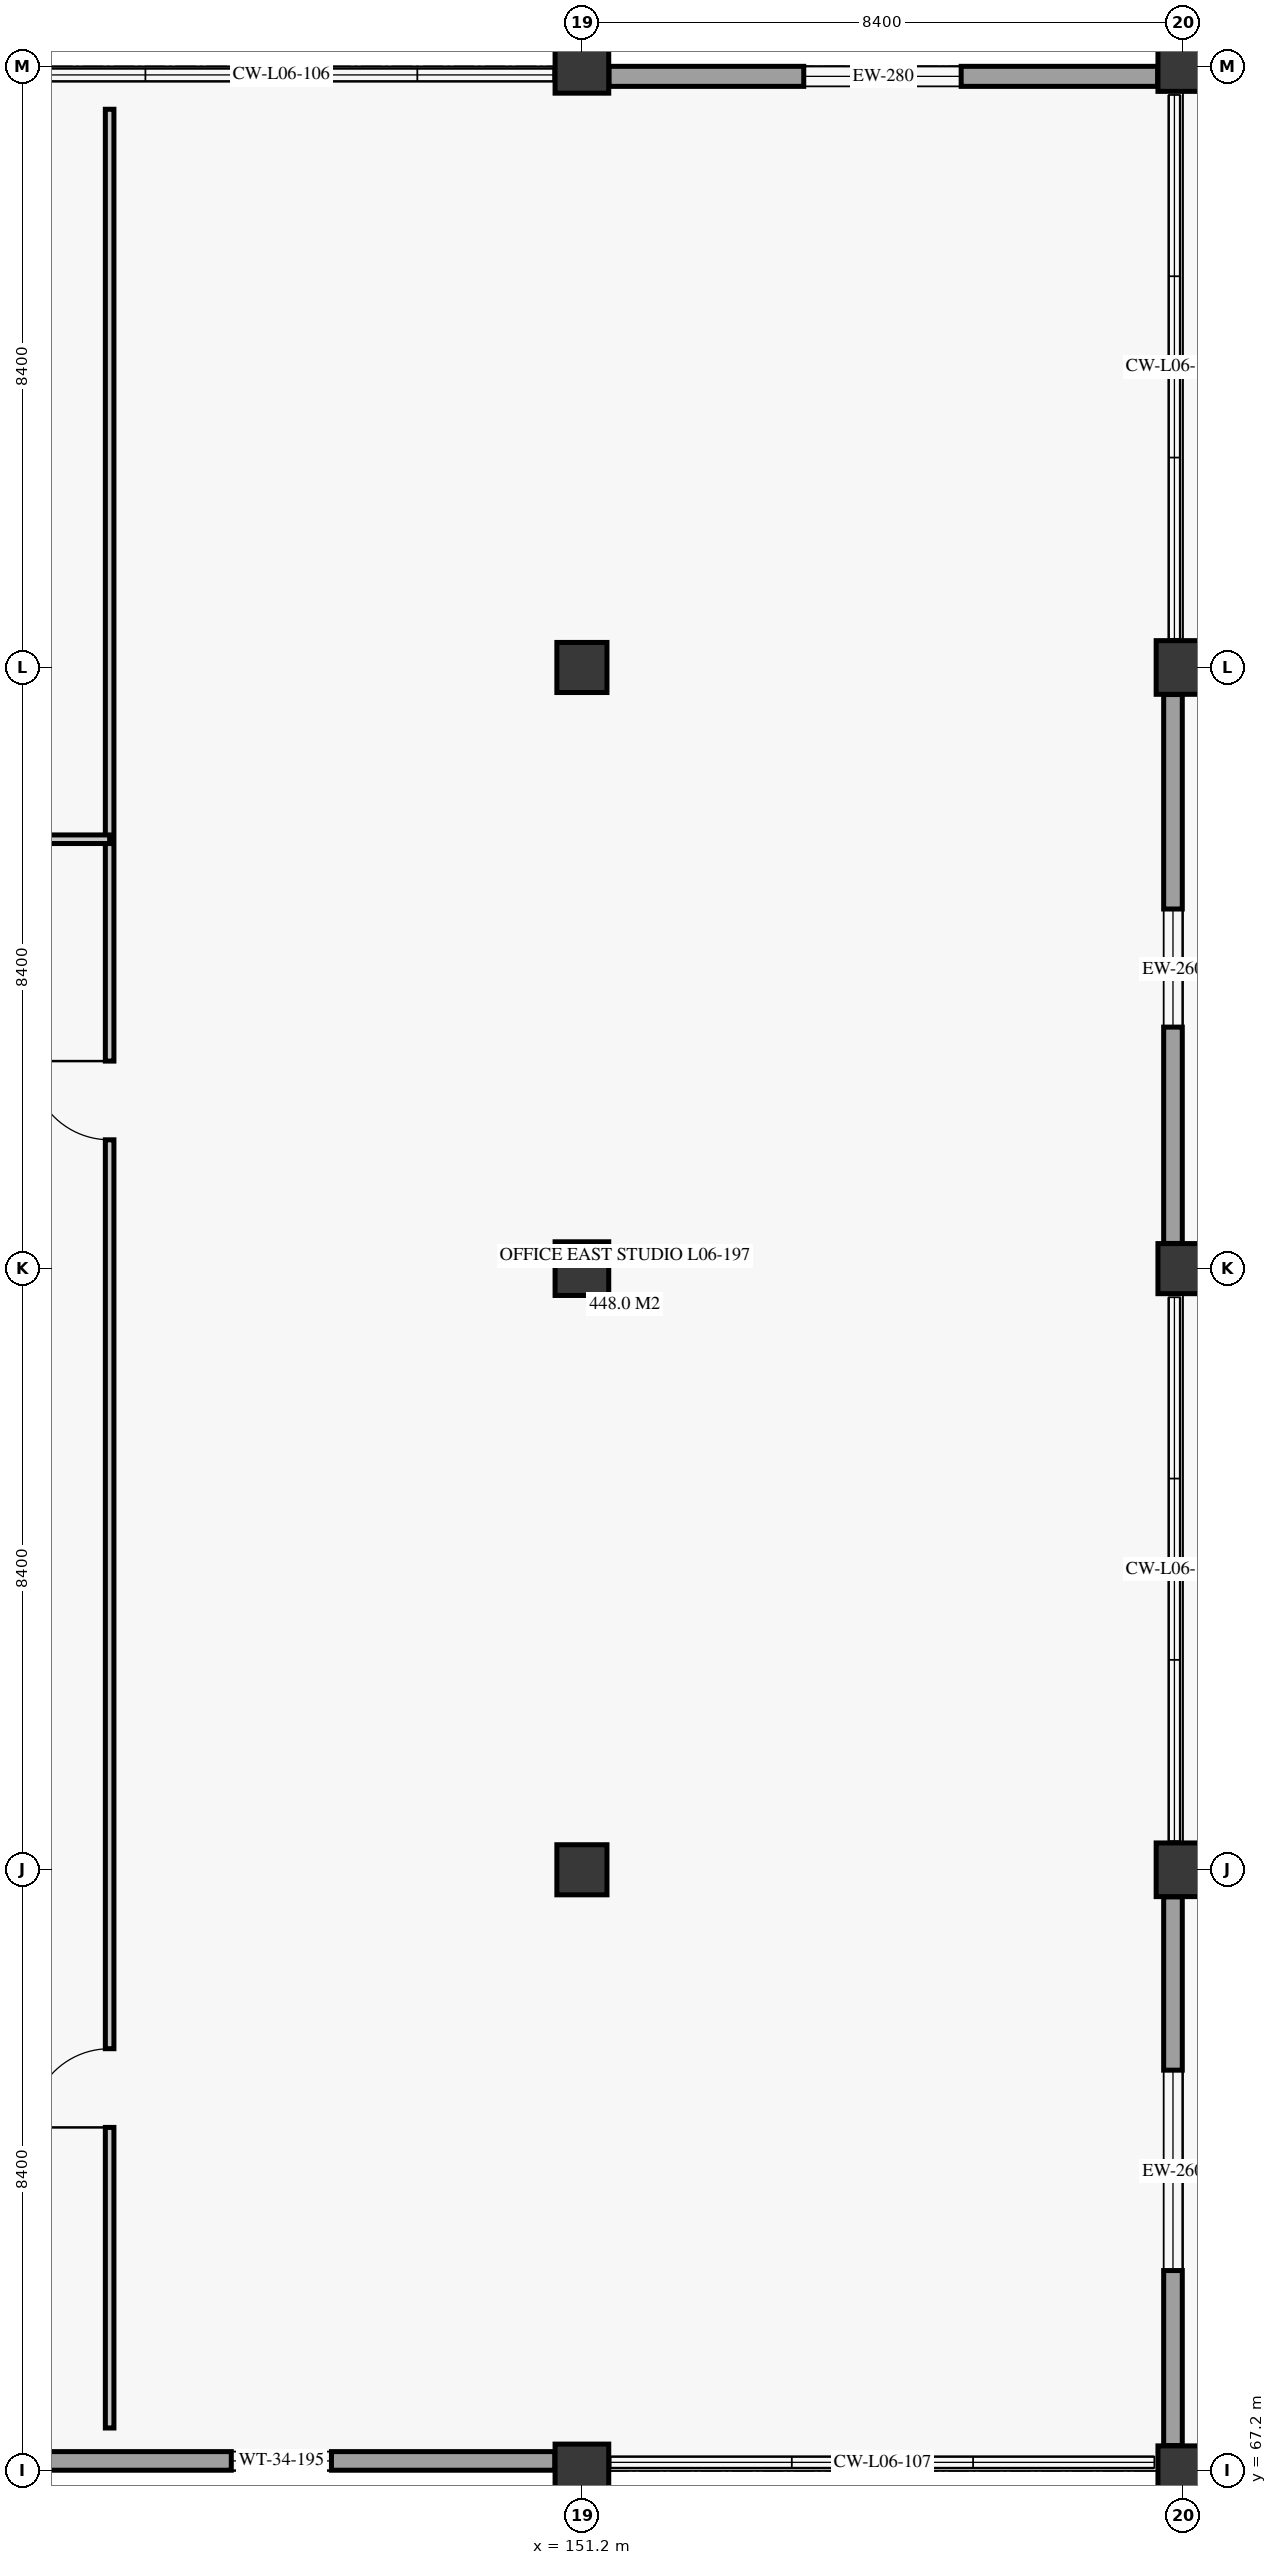
"""IFC4 building model, lengths in metres.
Left out: names, types, materials, properties, quantities, classifications, styles, units other than length and angle.
Written with IfcOpenShell. Run it as: python <this file> out.ifc"""

import sys

from ifc_helpers import new_model, si_unit, direction, frame, frame_2d, origin, origin_2d, place, context, subcontext, project, spatial, rectangle, extrude, element, fill, save


model = new_model("IFC4")
c1 = context("Model", 3, precision=1e-05, world=origin(), true_north=direction((0.0, 1.0)))
c2 = subcontext(c1, "Body", "Model", "MODEL_VIEW")
j1 = project(units=[si_unit("LENGTHUNIT", "METRE"), si_unit("PLANEANGLEUNIT", "RADIAN")], contexts=[c1])
p1 = place(None, origin())
s1 = spatial("IfcSite", under=j1, at=p1, CompositionType="ELEMENT")
p2 = place(p1, origin())
s2 = spatial("IfcBuilding", under=s1, at=p2, CompositionType="ELEMENT")
p3 = place(p2, frame((0.0, 0.0, 26.7)))
s3 = spatial("IfcBuildingStorey", under=s2, at=p3, CompositionType="ELEMENT", Elevation=26.7)
p4 = place(p3, frame((151.2, 67.2, 0.0), z_axis=(0.0, 0.0, 1.0), x_axis=(1.0, 0.0, 0.0)))
e1 = element("IfcColumn", 1, at=p4, inside=s3, PredefinedType="COLUMN", context=c2, shape_type="SweptSolid", body=[
    extrude(rectangle(XDim=0.75, YDim=0.75, at=origin_2d()), origin(), (0.0, 0.0, 1.0), 3.72),
])
p5 = place(p3, frame((151.2, 75.6, 0.0), z_axis=(0.0, 0.0, 1.0), x_axis=(1.0, 0.0, 0.0)))
e2 = element("IfcColumn", 2, at=p5, inside=s3, PredefinedType="COLUMN", context=c2, shape_type="SweptSolid", body=[
    extrude(rectangle(XDim=0.7, YDim=0.7, at=origin_2d()), origin(), (0.0, 0.0, 1.0), 3.72),
])
p6 = place(p3, frame((151.2, 84.0, 0.0), z_axis=(0.0, 0.0, 1.0), x_axis=(1.0, 0.0, 0.0)))
e3 = element("IfcColumn", 3, at=p6, inside=s3, PredefinedType="COLUMN", context=c2, shape_type="SweptSolid", body=[
    extrude(rectangle(XDim=0.75, YDim=0.75, at=origin_2d()), origin(), (0.0, 0.0, 1.0), 3.72),
])
p7 = place(p3, frame((151.2, 92.4, 0.0), z_axis=(0.0, 0.0, 1.0), x_axis=(1.0, 0.0, 0.0)))
e4 = element("IfcColumn", 4, at=p7, inside=s3, PredefinedType="COLUMN", context=c2, shape_type="SweptSolid", body=[
    extrude(rectangle(XDim=0.7, YDim=0.7, at=origin_2d()), origin(), (0.0, 0.0, 1.0), 3.72),
])
p8 = place(p3, frame((151.2, 100.8, 0.0), z_axis=(0.0, 0.0, 1.0), x_axis=(1.0, 0.0, 0.0)))
e5 = element("IfcColumn", 5, at=p8, inside=s3, PredefinedType="COLUMN", context=c2, shape_type="SweptSolid", body=[
    extrude(rectangle(XDim=0.75, YDim=0.75, at=origin_2d()), origin(), (0.0, 0.0, 1.0), 3.72),
])
p9 = place(p3, frame((159.6, 67.2, 0.0), z_axis=(0.0, 0.0, 1.0), x_axis=(1.0, 0.0, 0.0)))
e6 = element("IfcColumn", 6, at=p9, inside=s3, PredefinedType="COLUMN", context=c2, shape_type="SweptSolid", body=[
    extrude(rectangle(XDim=0.7, YDim=0.7, at=origin_2d()), origin(), (0.0, 0.0, 1.0), 3.72),
])
p10 = place(p3, frame((159.6, 75.6, 0.0), z_axis=(0.0, 0.0, 1.0), x_axis=(1.0, 0.0, 0.0)))
e7 = element("IfcColumn", 7, at=p10, inside=s3, PredefinedType="COLUMN", context=c2, shape_type="SweptSolid", body=[
    extrude(rectangle(XDim=0.75, YDim=0.75, at=origin_2d()), origin(), (0.0, 0.0, 1.0), 3.72),
])
p11 = place(p3, frame((159.6, 84.0, 0.0), z_axis=(0.0, 0.0, 1.0), x_axis=(1.0, 0.0, 0.0)))
e8 = element("IfcColumn", 8, at=p11, inside=s3, PredefinedType="COLUMN", context=c2, shape_type="SweptSolid", body=[
    extrude(rectangle(XDim=0.7, YDim=0.7, at=origin_2d()), origin(), (0.0, 0.0, 1.0), 3.72),
])
p12 = place(p3, frame((159.6, 92.4, 0.0), z_axis=(0.0, 0.0, 1.0), x_axis=(1.0, 0.0, 0.0)))
e9 = element("IfcColumn", 9, at=p12, inside=s3, PredefinedType="COLUMN", context=c2, shape_type="SweptSolid", body=[
    extrude(rectangle(XDim=0.75, YDim=0.75, at=origin_2d()), origin(), (0.0, 0.0, 1.0), 3.72),
])
p13 = place(p3, frame((159.6, 100.8, 0.0), z_axis=(0.0, 0.0, 1.0), x_axis=(1.0, 0.0, 0.0)))
e10 = element("IfcColumn", 10, at=p13, inside=s3, PredefinedType="COLUMN", context=c2, shape_type="SweptSolid", body=[
    extrude(rectangle(XDim=0.7, YDim=0.7, at=origin_2d()), origin(), (0.0, 0.0, 1.0), 3.72),
])
p14 = place(p3, frame((143.154, 67.34, 0.0), z_axis=(0.0, 0.0, 1.0), x_axis=(1.0, 0.0, 0.0)))
e11 = element("IfcWall", 11, at=p14, inside=s3, PredefinedType="SOLIDWALL", context=c2, shape_type="SweptSolid", body=[
    extrude(rectangle(XDim=7.668, YDim=0.26, at=frame_2d((3.834, 0.0))), origin(), (0.0, 0.0, 1.0), 3.04),
])
p15 = place(p14, frame((3.146, 0.0, 0.85)))
e12 = element("IfcOpeningElement", 12, at=p15, cuts=e11, PredefinedType="OPENING", context=c2, shape_type="SweptSolid", body=[
    extrude(rectangle(XDim=1.4, YDim=1.7, at=frame_2d((0.7, 0.85))), frame((0.0, 0.14, 0.0), z_axis=(0.0, -1.0, 0.0), x_axis=(1.0, 0.0, 0.0)), (0.0, 0.0, 1.0), 0.28),
])
p16 = place(p3, frame((151.578, 100.66, 0.0), z_axis=(0.0, 0.0, 1.0), x_axis=(1.0, 0.0, 0.0)))
e13 = element("IfcWall", 13, at=p16, inside=s3, PredefinedType="SOLIDWALL", context=c2, shape_type="SweptSolid", body=[
    extrude(rectangle(XDim=7.668, YDim=0.28, at=frame_2d((3.834, 0.0))), origin(), (0.0, 0.0, 1.0), 3.04),
])
p17 = place(p16, frame((2.722, 0.0, 0.85)))
e14 = element("IfcOpeningElement", 14, at=p17, cuts=e13, PredefinedType="OPENING", context=c2, shape_type="SweptSolid", body=[
    extrude(rectangle(XDim=2.2, YDim=1.8, at=frame_2d((1.1, 0.9))), frame((0.0, 0.15, 0.0), z_axis=(0.0, -1.0, 0.0), x_axis=(1.0, 0.0, 0.0)), (0.0, 0.0, 1.0), 0.3),
])
p18 = place(p3, frame((159.46, 67.554, 0.0), z_axis=(0.0, 0.0, 1.0), x_axis=(0.0, 1.0, 0.0)))
e15 = element("IfcWall", 15, at=p18, inside=s3, PredefinedType="SOLIDWALL", context=c2, shape_type="SweptSolid", body=[
    extrude(rectangle(XDim=7.668, YDim=0.26, at=frame_2d((3.834, 0.0))), origin(), (0.0, 0.0, 1.0), 3.04),
])
p19 = place(p18, frame((2.446, 0.0, 0.85)))
e16 = element("IfcOpeningElement", 16, at=p19, cuts=e15, PredefinedType="OPENING", context=c2, shape_type="SweptSolid", body=[
    extrude(rectangle(XDim=2.8, YDim=1.85, at=frame_2d((1.4, 0.925))), frame((0.0, 0.14, 0.0), z_axis=(0.0, -1.0, 0.0), x_axis=(1.0, 0.0, 0.0)), (0.0, 0.0, 1.0), 0.28),
])
p20 = place(p3, frame((159.46, 84.352, 0.0), z_axis=(0.0, 0.0, 1.0), x_axis=(0.0, 1.0, 0.0)))
e17 = element("IfcWall", 17, at=p20, inside=s3, PredefinedType="SOLIDWALL", context=c2, shape_type="SweptSolid", body=[
    extrude(rectangle(XDim=7.67, YDim=0.26, at=frame_2d((3.835, 0.0))), origin(), (0.0, 0.0, 1.0), 3.04),
])
p21 = place(p20, frame((3.023, 0.0, 0.85)))
e18 = element("IfcOpeningElement", 18, at=p21, cuts=e17, PredefinedType="OPENING", context=c2, shape_type="SweptSolid", body=[
    extrude(rectangle(XDim=1.65, YDim=1.75, at=frame_2d((0.825, 0.875))), frame((0.0, 0.14, 0.0), z_axis=(0.0, -1.0, 0.0), x_axis=(1.0, 0.0, 0.0)), (0.0, 0.0, 1.0), 0.28),
])
p22 = place(p3, frame((144.6, 67.8, 0.0), z_axis=(0.0, 0.0, 1.0), x_axis=(0.0, 1.0, 0.0)))
e19 = element("IfcWall", 19, at=p22, inside=s3, PredefinedType="PARTITIONING", context=c2, shape_type="SweptSolid", body=[
    extrude(rectangle(XDim=32.4, YDim=0.12, at=frame_2d((16.2, 0.0))), origin(), (0.0, 0.0, 1.0), 3.34),
])
p23 = place(p22, frame((4.2, 0.0, 0.0)))
e20 = element("IfcOpeningElement", 20, at=p23, cuts=e19, PredefinedType="OPENING", context=c2, shape_type="SweptSolid", body=[
    extrude(rectangle(XDim=1.1, YDim=2.15, at=frame_2d((0.55, 1.075))), frame((0.0, 0.07, 0.0), z_axis=(0.0, -1.0, 0.0), x_axis=(1.0, 0.0, 0.0)), (0.0, 0.0, 1.0), 0.14),
])
p24 = place(p22, frame((18.0, 0.0, 0.0)))
e21 = element("IfcOpeningElement", 21, at=p24, cuts=e19, PredefinedType="OPENING", context=c2, shape_type="SweptSolid", body=[
    extrude(rectangle(XDim=1.1, YDim=2.15, at=frame_2d((0.55, 1.075))), frame((0.0, 0.07, 0.0), z_axis=(0.0, -1.0, 0.0), x_axis=(1.0, 0.0, 0.0)), (0.0, 0.0, 1.0), 0.14),
])
p25 = place(p3, frame((118.2, 90.0, 0.0), z_axis=(0.0, 0.0, 1.0), x_axis=(1.0, 0.0, 0.0)))
e22 = element("IfcWall", 22, at=p25, inside=s3, PredefinedType="PARTITIONING", context=c2, shape_type="SweptSolid", body=[
    extrude(rectangle(XDim=26.4, YDim=0.12, at=frame_2d((13.2, 0.0))), origin(), (0.0, 0.0, 1.0), 3.34),
])
p26 = place(p25, frame((3.2, 0.0, 0.0)))
e23 = element("IfcOpeningElement", 23, at=p26, cuts=e22, PredefinedType="OPENING", context=c2, shape_type="SweptSolid", body=[
    extrude(rectangle(XDim=1.4, YDim=2.35, at=frame_2d((0.7, 1.175))), frame((0.0, 0.07, 0.0), z_axis=(0.0, -1.0, 0.0), x_axis=(1.0, 0.0, 0.0)), (0.0, 0.0, 1.0), 0.14),
])
p27 = place(p25, frame((21.0, 0.0, 0.0)))
e24 = element("IfcOpeningElement", 24, at=p27, cuts=e22, PredefinedType="OPENING", context=c2, shape_type="SweptSolid", body=[
    extrude(rectangle(XDim=1.4, YDim=2.35, at=frame_2d((0.7, 1.175))), frame((0.0, 0.07, 0.0), z_axis=(0.0, -1.0, 0.0), x_axis=(1.0, 0.0, 0.0)), (0.0, 0.0, 1.0), 0.14),
])
p28 = place(p15, origin())
e25 = element("IfcWindow", 25, at=p28, inside=s3, PartitioningType="SINGLE_PANEL", PredefinedType="WINDOW", context=c2, shape_type="SweptSolid", body=[
    extrude(rectangle(XDim=1.4, YDim=1.7, at=frame_2d((0.7, 0.85))), frame((0.0, 0.03, 0.0), z_axis=(0.0, -1.0, 0.0), x_axis=(1.0, 0.0, 0.0)), (0.0, 0.0, 1.0), 0.06),
])
fill(e12, e25)
p29 = place(p17, origin())
e26 = element("IfcWindow", 26, at=p29, inside=s3, PartitioningType="SINGLE_PANEL", PredefinedType="WINDOW", context=c2, shape_type="SweptSolid", body=[
    extrude(rectangle(XDim=2.2, YDim=1.8, at=frame_2d((1.1, 0.9))), frame((0.0, 0.03, 0.0), z_axis=(0.0, -1.0, 0.0), x_axis=(1.0, 0.0, 0.0)), (0.0, 0.0, 1.0), 0.06),
])
fill(e14, e26)
p30 = place(p19, origin())
e27 = element("IfcWindow", 27, at=p30, inside=s3, PartitioningType="SINGLE_PANEL", PredefinedType="WINDOW", context=c2, shape_type="SweptSolid", body=[
    extrude(rectangle(XDim=2.8, YDim=1.85, at=frame_2d((1.4, 0.925))), frame((0.0, 0.03, 0.0), z_axis=(0.0, -1.0, 0.0), x_axis=(1.0, 0.0, 0.0)), (0.0, 0.0, 1.0), 0.06),
])
fill(e16, e27)
p31 = place(p21, origin())
e28 = element("IfcWindow", 28, at=p31, inside=s3, PartitioningType="SINGLE_PANEL", PredefinedType="WINDOW", context=c2, shape_type="SweptSolid", body=[
    extrude(rectangle(XDim=1.65, YDim=1.75, at=frame_2d((0.825, 0.875))), frame((0.0, 0.03, 0.0), z_axis=(0.0, -1.0, 0.0), x_axis=(1.0, 0.0, 0.0)), (0.0, 0.0, 1.0), 0.06),
])
fill(e18, e28)
p32 = place(p23, origin())
e29 = element("IfcDoor", 29, at=p32, inside=s3, OperationType="SINGLE_SWING_LEFT", PredefinedType="DOOR", context=c2, shape_type="SweptSolid", body=[
    extrude(rectangle(XDim=1.1, YDim=2.15, at=frame_2d((0.55, 1.075))), frame((0.0, 0.025, 0.0), z_axis=(0.0, -1.0, 0.0), x_axis=(1.0, 0.0, 0.0)), (0.0, 0.0, 1.0), 0.05),
])
fill(e20, e29)
p33 = place(p24, origin())
e30 = element("IfcDoor", 30, at=p33, inside=s3, OperationType="SINGLE_SWING_RIGHT", PredefinedType="DOOR", context=c2, shape_type="SweptSolid", body=[
    extrude(rectangle(XDim=1.1, YDim=2.15, at=frame_2d((0.55, 1.075))), frame((0.0, 0.025, 0.0), z_axis=(0.0, -1.0, 0.0), x_axis=(1.0, 0.0, 0.0)), (0.0, 0.0, 1.0), 0.05),
])
fill(e21, e30)
save(model, sys.argv[1])
